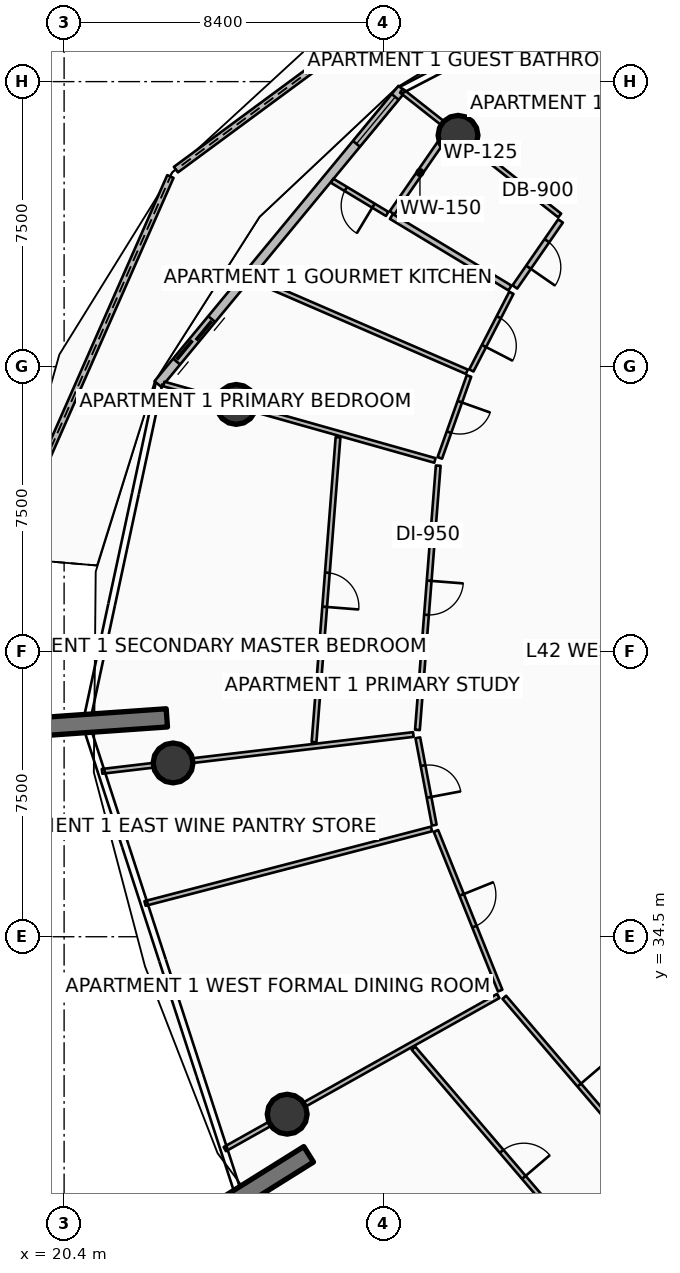
"""IFC4 building model, lengths in metres.
Left out: names, types, materials, properties, quantities, classifications, styles, units other than length and angle.
Written with IfcOpenShell. Run it as: python <this file> out.ifc"""

import sys

from ifc_helpers import new_model, si_unit, direction, frame, frame_2d, origin, origin_2d, place, context, subcontext, project, spatial, polyline, rectangle, circle, outline, extrude, element, fill, save


model = new_model("IFC4")
c1 = context("Model", 3, precision=1e-05, world=origin(), true_north=direction((0.0, 1.0)))
c2 = subcontext(c1, "Body", "Model", "MODEL_VIEW")
j1 = project(units=[si_unit("LENGTHUNIT", "METRE"), si_unit("PLANEANGLEUNIT", "RADIAN")], contexts=[c1])
p1 = place(None, origin())
s1 = spatial("IfcSite", under=j1, at=p1, CompositionType="ELEMENT")
p2 = place(p1, origin())
s2 = spatial("IfcBuilding", under=s1, at=p2, CompositionType="ELEMENT")
p3 = place(p2, frame((0.0, 0.0, 169.05)))
s3 = spatial("IfcBuildingStorey", under=s2, at=p3, CompositionType="ELEMENT", Elevation=169.05)
for number, where, z_axis, x_axis in (
    (1, (23.103, 40.259, 0.0), (0.0, 0.0, 1.0), (-0.998, -0.07, 0.0)),
    (2, (26.835, 28.774, 0.0), (0.0, 0.0, 1.0), (-0.848, -0.53, 0.0)),
):
    element("IfcWall", number, at=place(p3, frame(where, z_axis=z_axis, x_axis=x_axis)), inside=s3, PredefinedType="SOLIDWALL", context=c2, shape_type="SweptSolid", body=[
        extrude(rectangle(XDim=3.5, YDim=0.48, at=frame_2d((1.75, 0.0))), origin(), (0.0, 0.0, 1.0), 3.75),
    ])
for number, where, z_axis, x_axis in (
    (3, (30.766, 55.586, 0.0), (0.0, 0.0, 1.0), (1.0, 0.0, 0.0)),
    (4, (24.93, 48.506, 0.0), (0.0, 0.0, 1.0), (1.0, 0.0, 0.0)),
    (5, (23.267, 39.073, 0.0), (0.0, 0.0, 1.0), (1.0, 0.0, 0.0)),
    (6, (26.27, 29.831, 0.0), (0.0, 0.0, 1.0), (1.0, 0.0, 0.0)),
):
    element("IfcColumn", number, at=place(p3, frame(where, z_axis=z_axis, x_axis=x_axis)), inside=s3, PredefinedType="COLUMN", context=c2, shape_type="SweptSolid", body=[
        extrude(circle(Radius=0.525, at=origin_2d()), origin(), (0.0, 0.0, 1.0), 3.5),
    ])
p4 = place(p3, frame((31.7, 60.85, 0.0), z_axis=(0.0, 0.0, 1.0), x_axis=(-0.804716582715, -0.593659179584, 0.0)))
e7 = element("IfcWall", 7, at=p4, inside=s3, PredefinedType="PARAPET", context=c2, shape_type="SweptSolid", body=[
    extrude(outline(polyline([(0.0, 0.0), (10.386, 0.0), (10.386, 1.832), (5.193, 1.696), (0.0, 1.497), (0.0, 0.0)])), frame((0.0, 0.09, 0.0), z_axis=(0.0, -1.0, 0.0), x_axis=(1.0, 0.0, 0.0)), (0.0, 0.0, 1.0), 0.18),
])
p5 = place(p3, frame((23.197, 54.503, 0.0), z_axis=(0.0, 0.0, 1.0), x_axis=(-0.402973896797, -0.915211472011, 0.0)))
e8 = element("IfcWall", 8, at=p5, inside=s3, PredefinedType="PARAPET", context=c2, shape_type="SweptSolid", body=[
    extrude(outline(polyline([(0.0, 0.0), (10.953, 0.0), (10.953, 1.756), (5.477, 1.853), (0.0, 1.832), (0.0, 0.0)])), frame((0.0, 0.09, 0.0), z_axis=(0.0, -1.0, 0.0), x_axis=(1.0, 0.0, 0.0)), (0.0, 0.0, 1.0), 0.18),
])
p6 = place(p3, frame((29.291, 56.813, 0.0), z_axis=(0.0, 0.0, 1.0), x_axis=(-0.636771922292, -0.77105221547, 0.0)))
e9 = element("IfcWall", 9, at=p6, inside=s3, PredefinedType="SOLIDWALL", context=c2, shape_type="SweptSolid", body=[
    extrude(rectangle(XDim=10.082, YDim=0.24, at=frame_2d((5.041, 0.0))), origin(), (0.0, 0.0, 1.0), 2.45),
])
p7 = place(p6, frame((7.862, 0.0, 0.0)))
e10 = element("IfcOpeningElement", 10, at=p7, cuts=e9, PredefinedType="OPENING", context=c2, shape_type="SweptSolid", body=[
    extrude(rectangle(XDim=1.45, YDim=2.15, at=frame_2d((0.725, 1.075))), frame((0.0, 0.13, 0.0), z_axis=(0.0, -1.0, 0.0), x_axis=(1.0, 0.0, 0.0)), (0.0, 0.0, 1.0), 0.26),
])
p8 = place(p6, frame((0.28, 0.0, 0.65)))
e11 = element("IfcOpeningElement", 11, at=p8, cuts=e9, PredefinedType="OPENING", context=c2, shape_type="SweptSolid", body=[
    extrude(rectangle(XDim=1.6, YDim=1.5, at=frame_2d((0.8, 0.75))), frame((0.0, 0.13, 0.0), z_axis=(0.0, -1.0, 0.0), x_axis=(1.0, 0.0, 0.0)), (0.0, 0.0, 1.0), 0.26),
])
p9 = place(p3, frame((33.441, 53.477, 0.0), z_axis=(0.0, 0.0, 1.0), x_axis=(-0.785319981095, 0.619090080112, 0.0)))
e12 = element("IfcWall", 12, at=p9, inside=s3, PredefinedType="PARTITIONING", context=c2, shape_type="SweptSolid", body=[
    extrude(rectangle(XDim=5.301, YDim=0.125, at=frame_2d((2.65, 0.0))), origin(), (0.0, 0.0, 1.0), 2.94),
])
p10 = place(p3, frame((33.463, 53.333, 0.0), z_axis=(0.0, 0.0, 1.0), x_axis=(-0.568843105688, -0.822446059697, 0.0)))
e13 = element("IfcWall", 13, at=p10, inside=s3, PredefinedType="PARTITIONING", context=c2, shape_type="SweptSolid", body=[
    extrude(rectangle(XDim=2.111, YDim=0.15, at=frame_2d((1.056, 0.0))), origin(), (0.0, 0.0, 1.0), 2.94),
])
p11 = place(p10, frame((0.631, 0.0, 0.0)))
e14 = element("IfcOpeningElement", 14, at=p11, cuts=e13, PredefinedType="OPENING", context=c2, shape_type="SweptSolid", body=[
    extrude(rectangle(XDim=0.85, YDim=2.06, at=frame_2d((0.425, 1.03))), frame((0.0, 0.085, 0.0), z_axis=(0.0, -1.0, 0.0), x_axis=(1.0, 0.0, 0.0)), (0.0, 0.0, 1.0), 0.17),
])
p12 = place(p3, frame((30.498, 55.67, 0.0), z_axis=(0.0, 0.0, 1.0), x_axis=(-0.56886579211, -0.822430368218, 0.0)))
e15 = element("IfcWall", 15, at=p12, inside=s3, PredefinedType="PARTITIONING", context=c2, shape_type="SweptSolid", body=[
    extrude(rectangle(XDim=2.582, YDim=0.15, at=frame_2d((1.291, 0.0))), origin(), (0.0, 0.0, 1.0), 2.94),
])
p13 = place(p3, frame((32.133, 51.57, 0.0), z_axis=(0.0, 0.0, 1.0), x_axis=(-0.856320461768, 0.516444834186, 0.0)))
e16 = element("IfcWall", 16, at=p13, inside=s3, PredefinedType="PARTITIONING", context=c2, shape_type="SweptSolid", body=[
    extrude(rectangle(XDim=3.645, YDim=0.15, at=frame_2d((1.822, 0.0))), origin(), (0.0, 0.0, 1.0), 2.94),
])
p14 = place(p3, frame((28.901, 53.519, 0.0), z_axis=(0.0, 0.0, 1.0), x_axis=(-0.856306503803, 0.516467977269, 0.0)))
e17 = element("IfcWall", 17, at=p14, inside=s3, PredefinedType="PARTITIONING", context=c2, shape_type="SweptSolid", body=[
    extrude(rectangle(XDim=1.692, YDim=0.125, at=frame_2d((0.846, 0.0))), origin(), (0.0, 0.0, 1.0), 2.94),
])
p15 = place(p14, frame((0.421, 0.0, 0.0)))
e18 = element("IfcOpeningElement", 18, at=p15, cuts=e17, PredefinedType="OPENING", context=c2, shape_type="SweptSolid", body=[
    extrude(rectangle(XDim=0.85, YDim=2.06, at=frame_2d((0.425, 1.03))), frame((0.0, 0.073, 0.0), z_axis=(0.0, -1.0, 0.0), x_axis=(1.0, 0.0, 0.0)), (0.0, 0.0, 1.0), 0.145),
])
p16 = place(p3, frame((30.998, 49.365, 0.0), z_axis=(0.0, 0.0, 1.0), x_axis=(-0.917591640713, 0.397524314845, 0.0)))
e19 = element("IfcWall", 19, at=p16, inside=s3, PredefinedType="PARTITIONING", context=c2, shape_type="SweptSolid", body=[
    extrude(rectangle(XDim=6.182, YDim=0.125, at=frame_2d((3.091, 0.0))), origin(), (0.0, 0.0, 1.0), 2.94),
])
p17 = place(p3, frame((32.169, 51.443, 0.0), z_axis=(0.0, 0.0, 1.0), x_axis=(-0.458020211203, -0.888941778819, 0.0)))
e20 = element("IfcWall", 20, at=p17, inside=s3, PredefinedType="PARTITIONING", context=c2, shape_type="SweptSolid", body=[
    extrude(rectangle(XDim=2.297, YDim=0.125, at=frame_2d((1.149, 0.0))), origin(), (0.0, 0.0, 1.0), 2.94),
])
p18 = place(p17, frame((0.724, 0.0, 0.0)))
e21 = element("IfcOpeningElement", 21, at=p18, cuts=e20, PredefinedType="OPENING", context=c2, shape_type="SweptSolid", body=[
    extrude(rectangle(XDim=0.85, YDim=2.06, at=frame_2d((0.425, 1.03))), frame((0.0, 0.073, 0.0), z_axis=(0.0, -1.0, 0.0), x_axis=(1.0, 0.0, 0.0)), (0.0, 0.0, 1.0), 0.145),
])
p19 = place(p3, frame((31.054, 49.254, 0.0), z_axis=(0.0, 0.0, 1.0), x_axis=(-0.335247594753, -0.942130060136, 0.0)))
e22 = element("IfcWall", 22, at=p19, inside=s3, PredefinedType="PARTITIONING", context=c2, shape_type="SweptSolid", body=[
    extrude(rectangle(XDim=2.287, YDim=0.125, at=frame_2d((1.144, 0.0))), origin(), (0.0, 0.0, 1.0), 2.94),
])
p20 = place(p19, frame((0.719, 0.0, 0.0)))
e23 = element("IfcOpeningElement", 23, at=p20, cuts=e22, PredefinedType="OPENING", context=c2, shape_type="SweptSolid", body=[
    extrude(rectangle(XDim=0.85, YDim=2.06, at=frame_2d((0.425, 1.03))), frame((0.0, 0.073, 0.0), z_axis=(0.0, -1.0, 0.0), x_axis=(1.0, 0.0, 0.0)), (0.0, 0.0, 1.0), 0.145),
])
p21 = place(p3, frame((30.157, 47.032, 0.0), z_axis=(0.0, 0.0, 1.0), x_axis=(-0.962456736489, 0.271435131084, 0.0)))
e24 = element("IfcWall", 24, at=p21, inside=s3, PredefinedType="PARTITIONING", context=c2, shape_type="SweptSolid", body=[
    extrude(rectangle(XDim=7.412, YDim=0.125, at=frame_2d((3.706, 0.0))), origin(), (0.0, 0.0, 1.0), 2.94),
])
p22 = place(p3, frame((30.245, 46.896, 0.0), z_axis=(0.0, 0.0, 1.0), x_axis=(-0.078444324085, -0.996918496177, 0.0)))
e25 = element("IfcWall", 25, at=p22, inside=s3, PredefinedType="PARTITIONING", context=c2, shape_type="SweptSolid", body=[
    extrude(rectangle(XDim=6.975, YDim=0.125, at=frame_2d((3.487, 0.0))), origin(), (0.0, 0.0, 1.0), 2.94),
])
p23 = place(p22, frame((3.037, 0.0, 0.0)))
e26 = element("IfcOpeningElement", 26, at=p23, cuts=e25, PredefinedType="OPENING", context=c2, shape_type="SweptSolid", body=[
    extrude(rectangle(XDim=0.9, YDim=2.08, at=frame_2d((0.45, 1.04))), frame((0.0, 0.073, 0.0), z_axis=(0.0, -1.0, 0.0), x_axis=(1.0, 0.0, 0.0)), (0.0, 0.0, 1.0), 0.145),
])
p24 = place(p3, frame((27.608, 47.639, 0.0), z_axis=(0.0, 0.0, 1.0), x_axis=(-0.078490541144, -0.996914858426, 0.0)))
e27 = element("IfcWall", 27, at=p24, inside=s3, PredefinedType="PARTITIONING", context=c2, shape_type="SweptSolid", body=[
    extrude(rectangle(XDim=8.044, YDim=0.125, at=frame_2d((4.022, 0.0))), origin(), (0.0, 0.0, 1.0), 2.94),
])
p25 = place(p24, frame((3.572, 0.0, 0.0)))
e28 = element("IfcOpeningElement", 28, at=p25, cuts=e27, PredefinedType="OPENING", context=c2, shape_type="SweptSolid", body=[
    extrude(rectangle(XDim=0.9, YDim=2.08, at=frame_2d((0.45, 1.04))), frame((0.0, 0.073, 0.0), z_axis=(0.0, -1.0, 0.0), x_axis=(1.0, 0.0, 0.0)), (0.0, 0.0, 1.0), 0.145),
])
p26 = place(p3, frame((29.59, 39.821, 0.0), z_axis=(0.0, 0.0, 1.0), x_axis=(-0.993070354128, -0.117521367213, 0.0)))
e29 = element("IfcWall", 29, at=p26, inside=s3, PredefinedType="PARTITIONING", context=c2, shape_type="SweptSolid", body=[
    extrude(rectangle(XDim=8.247, YDim=0.125, at=frame_2d((4.124, 0.0))), origin(), (0.0, 0.0, 1.0), 2.94),
])
p27 = place(p3, frame((30.068, 37.336, 0.0), z_axis=(0.0, 0.0, 1.0), x_axis=(-0.967797769308, -0.251728976723, 0.0)))
e30 = element("IfcWall", 30, at=p27, inside=s3, PredefinedType="PARTITIONING", context=c2, shape_type="SweptSolid", body=[
    extrude(rectangle(XDim=7.789, YDim=0.125, at=frame_2d((3.895, 0.0))), origin(), (0.0, 0.0, 1.0), 2.94),
])
p28 = place(p3, frame((29.707, 39.734, 0.0), z_axis=(0.0, 0.0, 1.0), x_axis=(0.185057746292, -0.9827276482, 0.0)))
e31 = element("IfcWall", 31, at=p28, inside=s3, PredefinedType="PARTITIONING", context=c2, shape_type="SweptSolid", body=[
    extrude(rectangle(XDim=2.338, YDim=0.125, at=frame_2d((1.169, 0.0))), origin(), (0.0, 0.0, 1.0), 2.94),
])
p29 = place(p28, frame((0.744, 0.0, 0.0)))
e32 = element("IfcOpeningElement", 32, at=p29, cuts=e31, PredefinedType="OPENING", context=c2, shape_type="SweptSolid", body=[
    extrude(rectangle(XDim=0.85, YDim=2.06, at=frame_2d((0.425, 1.03))), frame((0.0, 0.073, 0.0), z_axis=(0.0, -1.0, 0.0), x_axis=(1.0, 0.0, 0.0)), (0.0, 0.0, 1.0), 0.145),
])
p30 = place(p3, frame((30.185, 37.284, 0.0), z_axis=(0.0, 0.0, 1.0), x_axis=(0.373193309098, -0.927753606322, 0.0)))
e33 = element("IfcWall", 33, at=p30, inside=s3, PredefinedType="PARTITIONING", context=c2, shape_type="SweptSolid", body=[
    extrude(rectangle(XDim=4.528, YDim=0.125, at=frame_2d((2.264, 0.0))), origin(), (0.0, 0.0, 1.0), 2.94),
])
p31 = place(p30, frame((1.814, 0.0, 0.0)))
e34 = element("IfcOpeningElement", 34, at=p31, cuts=e33, PredefinedType="OPENING", context=c2, shape_type="SweptSolid", body=[
    extrude(rectangle(XDim=0.9, YDim=2.08, at=frame_2d((0.45, 1.04))), frame((0.0, 0.073, 0.0), z_axis=(0.0, -1.0, 0.0), x_axis=(1.0, 0.0, 0.0)), (0.0, 0.0, 1.0), 0.145),
])
p32 = place(p3, frame((31.825, 32.941, 0.0), z_axis=(0.0, 0.0, 1.0), x_axis=(-0.872491881101, -0.488628608877, 0.0)))
e35 = element("IfcWall", 35, at=p32, inside=s3, PredefinedType="PARTITIONING", context=c2, shape_type="SweptSolid", body=[
    extrude(rectangle(XDim=8.247, YDim=0.125, at=frame_2d((4.124, 0.0))), origin(), (0.0, 0.0, 1.0), 2.94),
])
p33 = place(p3, frame((31.983, 32.907, 0.0), z_axis=(0.0, 0.0, 1.0), x_axis=(0.649447060425, -0.76040680935, 0.0)))
e36 = element("IfcWall", 36, at=p33, inside=s3, PredefinedType="PARTITIONING", context=c2, shape_type="SweptSolid", body=[
    extrude(rectangle(XDim=6.975, YDim=0.125, at=frame_2d((3.487, 0.0))), origin(), (0.0, 0.0, 1.0), 2.94),
])
p34 = place(p33, frame((3.037, 0.0, 0.0)))
e37 = element("IfcOpeningElement", 37, at=p34, cuts=e36, PredefinedType="OPENING", context=c2, shape_type="SweptSolid", body=[
    extrude(rectangle(XDim=0.9, YDim=2.08, at=frame_2d((0.45, 1.04))), frame((0.0, 0.073, 0.0), z_axis=(0.0, -1.0, 0.0), x_axis=(1.0, 0.0, 0.0)), (0.0, 0.0, 1.0), 0.145),
])
p35 = place(p3, frame((29.593, 31.568, 0.0), z_axis=(0.0, 0.0, 1.0), x_axis=(0.649460624158, -0.760395224649, 0.0)))
e38 = element("IfcWall", 38, at=p35, inside=s3, PredefinedType="PARTITIONING", context=c2, shape_type="SweptSolid", body=[
    extrude(rectangle(XDim=8.044, YDim=0.125, at=frame_2d((4.022, 0.0))), origin(), (0.0, 0.0, 1.0), 2.94),
])
p36 = place(p35, frame((3.572, 0.0, 0.0)))
e39 = element("IfcOpeningElement", 39, at=p36, cuts=e38, PredefinedType="OPENING", context=c2, shape_type="SweptSolid", body=[
    extrude(rectangle(XDim=0.9, YDim=2.08, at=frame_2d((0.45, 1.04))), frame((0.0, 0.073, 0.0), z_axis=(0.0, -1.0, 0.0), x_axis=(1.0, 0.0, 0.0)), (0.0, 0.0, 1.0), 0.145),
])
p37 = place(p7, origin())
e40 = element("IfcDoor", 40, at=p37, inside=s3, OperationType="DOUBLE_DOOR_SLIDING", PredefinedType="DOOR", context=c2, shape_type="SweptSolid", body=[
    extrude(rectangle(XDim=1.45, YDim=2.15, at=frame_2d((0.725, 1.075))), frame((0.0, 0.025, 0.0), z_axis=(0.0, -1.0, 0.0), x_axis=(1.0, 0.0, 0.0)), (0.0, 0.0, 1.0), 0.05),
])
fill(e10, e40)
p38 = place(p8, origin())
e41 = element("IfcWindow", 41, at=p38, inside=s3, PartitioningType="SINGLE_PANEL", PredefinedType="WINDOW", context=c2, shape_type="SweptSolid", body=[
    extrude(rectangle(XDim=1.6, YDim=1.5, at=frame_2d((0.8, 0.75))), frame((0.0, 0.03, 0.0), z_axis=(0.0, -1.0, 0.0), x_axis=(1.0, 0.0, 0.0)), (0.0, 0.0, 1.0), 0.06),
])
fill(e11, e41)
p39 = place(p11, origin())
e42 = element("IfcDoor", 42, at=p39, inside=s3, OperationType="SINGLE_SWING_RIGHT", PredefinedType="DOOR", context=c2, shape_type="SweptSolid", body=[
    extrude(rectangle(XDim=0.85, YDim=2.06, at=frame_2d((0.425, 1.03))), frame((0.0, 0.025, 0.0), z_axis=(0.0, -1.0, 0.0), x_axis=(1.0, 0.0, 0.0)), (0.0, 0.0, 1.0), 0.05),
])
fill(e14, e42)
p40 = place(p15, origin())
e43 = element("IfcDoor", 43, at=p40, inside=s3, OperationType="SINGLE_SWING_LEFT", PredefinedType="DOOR", context=c2, shape_type="SweptSolid", body=[
    extrude(rectangle(XDim=0.85, YDim=2.06, at=frame_2d((0.425, 1.03))), frame((0.0, 0.025, 0.0), z_axis=(0.0, -1.0, 0.0), x_axis=(1.0, 0.0, 0.0)), (0.0, 0.0, 1.0), 0.05),
])
fill(e18, e43)
p41 = place(p18, origin())
e44 = element("IfcDoor", 44, at=p41, inside=s3, OperationType="SINGLE_SWING_RIGHT", PredefinedType="DOOR", context=c2, shape_type="SweptSolid", body=[
    extrude(rectangle(XDim=0.85, YDim=2.06, at=frame_2d((0.425, 1.03))), frame((0.0, 0.025, 0.0), z_axis=(0.0, -1.0, 0.0), x_axis=(1.0, 0.0, 0.0)), (0.0, 0.0, 1.0), 0.05),
])
fill(e21, e44)
p42 = place(p20, origin())
e45 = element("IfcDoor", 45, at=p42, inside=s3, OperationType="SINGLE_SWING_LEFT", PredefinedType="DOOR", context=c2, shape_type="SweptSolid", body=[
    extrude(rectangle(XDim=0.85, YDim=2.06, at=frame_2d((0.425, 1.03))), frame((0.0, 0.025, 0.0), z_axis=(0.0, -1.0, 0.0), x_axis=(1.0, 0.0, 0.0)), (0.0, 0.0, 1.0), 0.05),
])
fill(e23, e45)
p43 = place(p23, origin())
e46 = element("IfcDoor", 46, at=p43, inside=s3, OperationType="SINGLE_SWING_LEFT", PredefinedType="DOOR", context=c2, shape_type="SweptSolid", body=[
    extrude(rectangle(XDim=0.9, YDim=2.08, at=frame_2d((0.45, 1.04))), frame((0.0, 0.025, 0.0), z_axis=(0.0, -1.0, 0.0), x_axis=(1.0, 0.0, 0.0)), (0.0, 0.0, 1.0), 0.05),
])
fill(e26, e46)
p44 = place(p25, origin())
e47 = element("IfcDoor", 47, at=p44, inside=s3, OperationType="SINGLE_SWING_RIGHT", PredefinedType="DOOR", context=c2, shape_type="SweptSolid", body=[
    extrude(rectangle(XDim=0.9, YDim=2.08, at=frame_2d((0.45, 1.04))), frame((0.0, 0.025, 0.0), z_axis=(0.0, -1.0, 0.0), x_axis=(1.0, 0.0, 0.0)), (0.0, 0.0, 1.0), 0.05),
])
fill(e28, e47)
p45 = place(p29, origin())
e48 = element("IfcDoor", 48, at=p45, inside=s3, OperationType="SINGLE_SWING_RIGHT", PredefinedType="DOOR", context=c2, shape_type="SweptSolid", body=[
    extrude(rectangle(XDim=0.85, YDim=2.06, at=frame_2d((0.425, 1.03))), frame((0.0, 0.025, 0.0), z_axis=(0.0, -1.0, 0.0), x_axis=(1.0, 0.0, 0.0)), (0.0, 0.0, 1.0), 0.05),
])
fill(e32, e48)
p46 = place(p31, origin())
e49 = element("IfcDoor", 49, at=p46, inside=s3, OperationType="SINGLE_SWING_LEFT", PredefinedType="DOOR", context=c2, shape_type="SweptSolid", body=[
    extrude(rectangle(XDim=0.9, YDim=2.08, at=frame_2d((0.45, 1.04))), frame((0.0, 0.025, 0.0), z_axis=(0.0, -1.0, 0.0), x_axis=(1.0, 0.0, 0.0)), (0.0, 0.0, 1.0), 0.05),
])
fill(e34, e49)
p47 = place(p34, origin())
e50 = element("IfcDoor", 50, at=p47, inside=s3, OperationType="SINGLE_SWING_LEFT", PredefinedType="DOOR", context=c2, shape_type="SweptSolid", body=[
    extrude(rectangle(XDim=0.9, YDim=2.08, at=frame_2d((0.45, 1.04))), frame((0.0, 0.025, 0.0), z_axis=(0.0, -1.0, 0.0), x_axis=(1.0, 0.0, 0.0)), (0.0, 0.0, 1.0), 0.05),
])
fill(e37, e50)
p48 = place(p36, origin())
e51 = element("IfcDoor", 51, at=p48, inside=s3, OperationType="SINGLE_SWING_RIGHT", PredefinedType="DOOR", context=c2, shape_type="SweptSolid", body=[
    extrude(rectangle(XDim=0.9, YDim=2.08, at=frame_2d((0.45, 1.04))), frame((0.0, 0.025, 0.0), z_axis=(0.0, -1.0, 0.0), x_axis=(1.0, 0.0, 0.0)), (0.0, 0.0, 1.0), 0.05),
])
fill(e39, e51)
save(model, sys.argv[1])
